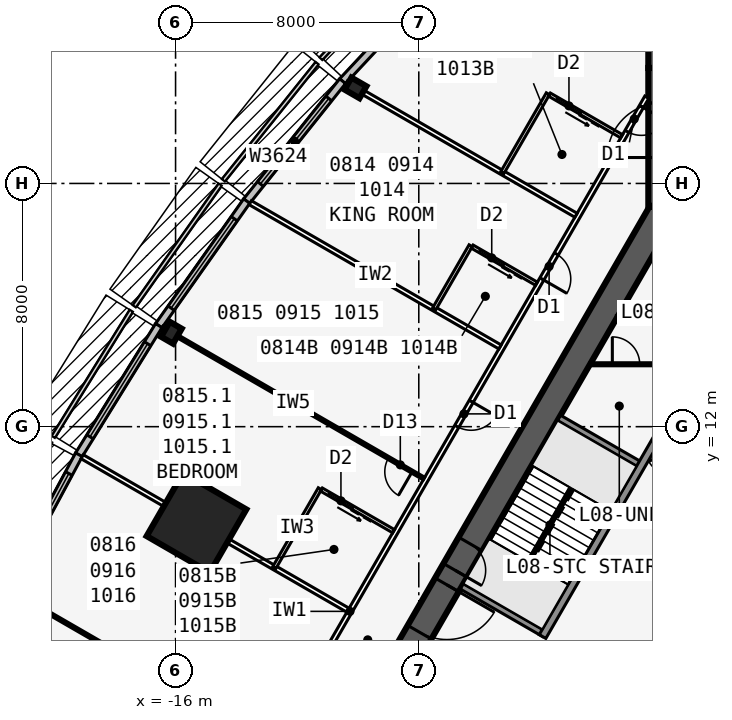
"""IFC4 building model, lengths in metres.
Left out: names, types, materials, properties, quantities, classifications, styles, units other than length and angle.
Written with IfcOpenShell. Run it as: python <this file> out.ifc"""

import sys

from ifc_helpers import new_model, si_unit, direction, frame, frame_2d, origin, origin_2d, place, context, subcontext, project, spatial, rectangle, i_section, extrude, element, fill, save


model = new_model("IFC4")
c1 = context("Model", 3, precision=1e-05, world=origin(), true_north=direction((0.0, 1.0)))
c2 = subcontext(c1, "Body", "Model", "MODEL_VIEW")
j1 = project(units=[si_unit("LENGTHUNIT", "METRE"), si_unit("PLANEANGLEUNIT", "RADIAN")], contexts=[c1])
p1 = place(None, origin())
s1 = spatial("IfcSite", under=j1, at=p1, CompositionType="ELEMENT")
p2 = place(p1, origin())
s2 = spatial("IfcBuilding", under=s1, at=p2, CompositionType="ELEMENT")
p3 = place(p2, frame((0.0, 0.0, 38.7)))
s3 = spatial("IfcBuildingStorey", under=s2, at=p3, CompositionType="ELEMENT", Elevation=38.7)
p4 = place(p3, frame((16.5, -9.526, 0.0), z_axis=(0.0, 0.0, 1.0), x_axis=(-0.499999749417, 0.866025548458, 0.0)))
e1 = element("IfcWall", 1, at=p4, inside=s3, PredefinedType="SHEAR", context=c2, shape_type="SweptSolid", body=[
    extrude(rectangle(XDim=33.0, YDim=0.9, at=frame_2d((16.5, 0.0))), origin(), (0.0, 0.0, 1.0), 3.4),
])
p5 = place(p4, frame((14.15, 0.0, 0.0)))
e2 = element("IfcOpeningElement", 2, at=p5, cuts=e1, PredefinedType="OPENING", context=c2, shape_type="SweptSolid", body=[
    extrude(rectangle(XDim=1.8, YDim=2.13, at=frame_2d((0.9, 1.065))), frame((0.0, 0.46, 0.0), z_axis=(0.0, -1.0, 0.0), x_axis=(1.0, 0.0, 0.0)), (0.0, 0.0, 1.0), 0.92),
])
p6 = place(p4, frame((12.6, 0.0, 0.0)))
e3 = element("IfcOpeningElement", 3, at=p6, cuts=e1, PredefinedType="OPENING", context=c2, shape_type="SweptSolid", body=[
    extrude(rectangle(XDim=1.0, YDim=2.13, at=frame_2d((0.5, 1.065))), frame((0.0, 0.46, 0.0), z_axis=(0.0, -1.0, 0.0), x_axis=(1.0, 0.0, 0.0)), (0.0, 0.0, 1.0), 0.92),
])
p7 = place(p3, frame((0.0, 19.052, 0.0), z_axis=(0.0, 0.0, 1.0), x_axis=(-0.499999749417, -0.866025548458, 0.0)))
e4 = element("IfcWall", 4, at=p7, inside=s3, PredefinedType="SHEAR", context=c2, shape_type="SweptSolid", body=[
    extrude(rectangle(XDim=33.0, YDim=0.9, at=frame_2d((16.5, 0.0))), origin(), (0.0, 0.0, 1.0), 3.4),
])
p8 = place(p7, frame((14.15, 0.0, 0.0)))
e5 = element("IfcOpeningElement", 5, at=p8, cuts=e4, PredefinedType="OPENING", context=c2, shape_type="SweptSolid", body=[
    extrude(rectangle(XDim=1.8, YDim=2.13, at=frame_2d((0.9, 1.065))), frame((0.0, 0.46, 0.0), z_axis=(0.0, -1.0, 0.0), x_axis=(1.0, 0.0, 0.0)), (0.0, 0.0, 1.0), 0.92),
])
p9 = place(p7, frame((12.6, 0.0, 0.0)))
e6 = element("IfcOpeningElement", 6, at=p9, cuts=e4, PredefinedType="OPENING", context=c2, shape_type="SweptSolid", body=[
    extrude(rectangle(XDim=1.0, YDim=2.13, at=frame_2d((0.5, 1.065))), frame((0.0, 0.46, 0.0), z_axis=(0.0, -1.0, 0.0), x_axis=(1.0, 0.0, 0.0)), (0.0, 0.0, 1.0), 0.92),
])
p10 = place(p3, frame((-0.062, 11.794, 0.0), z_axis=(0.0, 0.0, 1.0), x_axis=(-0.500006680225, -0.86602154692, 0.0)))
e7 = element("IfcWall", 7, at=p10, inside=s3, PredefinedType="SOLIDWALL", context=c2, shape_type="SweptSolid", body=[
    extrude(rectangle(XDim=7.733, YDim=0.25, at=frame_2d((3.866, 0.0))), origin(), (0.0, 0.0, 1.0), 3.235),
])
for number, where, z_axis, x_axis in (
    (8, (-0.679, 10.727, 0.0), (0.0, 0.0, 1.0), (-0.866, 0.5, 0.0)),
    (9, (-3.879, 5.184, 0.0), (0.0, 0.0, 1.0), (-0.866, 0.5, 0.0)),
):
    element("IfcWall", number, at=place(p3, frame(where, z_axis=z_axis, x_axis=x_axis)), inside=s3, PredefinedType="SOLIDWALL", context=c2, shape_type="SweptSolid", body=[
        extrude(rectangle(XDim=3.125, YDim=0.2, at=frame_2d((1.562, 0.0))), origin(), (0.0, 0.0, 1.0), 3.235),
    ])
p11 = place(p3, frame((0.0, 19.052, 0.0), z_axis=(0.0, 0.0, 1.0), x_axis=(0.0, 1.0, 0.0)))
e10 = element("IfcWall", 10, at=p11, inside=s3, PredefinedType="SHEAR", context=c2, shape_type="SweptSolid", body=[
    extrude(rectangle(XDim=4.746, YDim=0.9, at=frame_2d((2.373, 0.0))), origin(), (0.0, 0.0, 1.0), 3.4),
])
p12 = place(p11, frame((1.8, 0.0, 0.0)))
e11 = element("IfcOpeningElement", 11, at=p12, cuts=e10, PredefinedType="OPENING", context=c2, shape_type="SweptSolid", body=[
    extrude(rectangle(XDim=1.8, YDim=2.13, at=frame_2d((0.9, 1.065))), frame((0.0, 0.46, 0.0), z_axis=(0.0, -1.0, 0.0), x_axis=(1.0, 0.0, 0.0)), (0.0, 0.0, 1.0), 0.92),
])
p13 = place(p3, frame((0.0, 23.799, 0.0), z_axis=(0.0, 0.0, 1.0), x_axis=(0.0, 1.0, 0.0)))
e12 = element("IfcWall", 12, at=p13, inside=s3, PredefinedType="SHEAR", context=c2, shape_type="SweptSolid", body=[
    extrude(rectangle(XDim=1.155, YDim=0.9, at=frame_2d((0.577, 0.0))), origin(), (0.0, 0.0, 1.0), 3.4),
])
for number, where, z_axis, x_axis in (
    (13, (-10.083, 23.142, 0.0), (0.0, 0.0, 1.0), (-0.5, -0.866, 0.0)),
    (14, (-16.137, 15.09, 0.0), (0.0, 0.0, 1.0), (-0.866, 0.5, 0.0)),
):
    element("IfcColumn", number, at=place(p3, frame(where, z_axis=z_axis, x_axis=x_axis)), inside=s3, PredefinedType="COLUMN", context=c2, shape_type="SweptSolid", body=[
        extrude(i_section(OverallWidth=0.455, OverallDepth=0.569, WebThickness=0.078, FlangeThickness=0.125, at=origin_2d()), origin(), (0.0, 0.0, 1.0), 3.4),
    ])
p14 = place(p3, frame((-15.312, 8.84, 0.0), z_axis=(0.0, 0.0, 1.0), x_axis=(-0.866025403784, 0.5, 0.0)))
e15 = element("IfcColumn", 15, at=p14, inside=s3, PredefinedType="COLUMN", context=c2, shape_type="SweptSolid", body=[
    extrude(rectangle(XDim=2.4, YDim=2.4, at=origin_2d()), origin(), (0.0, 0.0, 1.0), 3.4),
])
p15 = place(p3, frame((-4.909, 29.36, 0.0), z_axis=(0.0, 0.0, 1.0), x_axis=(-0.682289646561, -0.731081964075, 0.0)))
e16 = element("IfcWall", 16, at=p15, inside=s3, PredefinedType="STANDARD", context=c2, shape_type="SweptSolid", body=[
    extrude(rectangle(XDim=8.211, YDim=0.25, at=frame_2d((4.105, 0.0))), origin(), (0.0, 0.0, 1.0), 3.235),
])
p16 = place(p15, frame((2.006, 0.0, 0.45)))
e17 = element("IfcOpeningElement", 17, at=p16, cuts=e16, PredefinedType="OPENING", context=c2, shape_type="SweptSolid", body=[
    extrude(rectangle(XDim=4.2, YDim=2.4, at=frame_2d((2.1, 1.2))), frame((0.0, 0.135, 0.0), z_axis=(0.0, -1.0, 0.0), x_axis=(1.0, 0.0, 0.0)), (0.0, 0.0, 1.0), 0.27),
])
p17 = place(p3, frame((-10.505, 23.364, 0.0), z_axis=(0.0, 0.0, 1.0), x_axis=(-0.624594965756, -0.780948864364, 0.0)))
e18 = element("IfcWall", 18, at=p17, inside=s3, PredefinedType="STANDARD", context=c2, shape_type="SweptSolid", body=[
    extrude(rectangle(XDim=5.058, YDim=0.25, at=frame_2d((2.529, 0.0))), origin(), (0.0, 0.0, 1.0), 3.235),
])
p18 = place(p17, frame((0.729, 0.0, 0.45)))
e19 = element("IfcOpeningElement", 19, at=p18, cuts=e18, PredefinedType="OPENING", context=c2, shape_type="SweptSolid", body=[
    extrude(rectangle(XDim=3.6, YDim=2.4, at=frame_2d((1.8, 1.2))), frame((0.0, 0.135, 0.0), z_axis=(0.0, -1.0, 0.0), x_axis=(1.0, 0.0, 0.0)), (0.0, 0.0, 1.0), 0.27),
])
p19 = place(p3, frame((-13.659, 19.42, 0.0), z_axis=(0.0, 0.0, 1.0), x_axis=(-0.5766431066, -0.81699616132, 0.0)))
e20 = element("IfcWall", 20, at=p19, inside=s3, PredefinedType="STANDARD", context=c2, shape_type="SweptSolid", body=[
    extrude(rectangle(XDim=5.021, YDim=0.25, at=frame_2d((2.51, 0.0))), origin(), (0.0, 0.0, 1.0), 3.235),
])
p20 = place(p19, frame((0.71, 0.0, 0.45)))
e21 = element("IfcOpeningElement", 21, at=p20, cuts=e20, PredefinedType="OPENING", context=c2, shape_type="SweptSolid", body=[
    extrude(rectangle(XDim=3.6, YDim=2.4, at=frame_2d((1.8, 1.2))), frame((0.0, 0.135, 0.0), z_axis=(0.0, -1.0, 0.0), x_axis=(1.0, 0.0, 0.0)), (0.0, 0.0, 1.0), 0.27),
])
p21 = place(p3, frame((-16.551, 15.324, 0.0), z_axis=(0.0, 0.0, 1.0), x_axis=(-0.526132807704, -0.850402415717, 0.0)))
e22 = element("IfcWall", 22, at=p21, inside=s3, PredefinedType="STANDARD", context=c2, shape_type="SweptSolid", body=[
    extrude(rectangle(XDim=5.002, YDim=0.25, at=frame_2d((2.501, 0.0))), origin(), (0.0, 0.0, 1.0), 3.235),
])
p22 = place(p21, frame((0.701, 0.0, 0.45)))
e23 = element("IfcOpeningElement", 23, at=p22, cuts=e22, PredefinedType="OPENING", context=c2, shape_type="SweptSolid", body=[
    extrude(rectangle(XDim=3.6, YDim=2.4, at=frame_2d((1.8, 1.2))), frame((0.0, 0.135, 0.0), z_axis=(0.0, -1.0, 0.0), x_axis=(1.0, 0.0, 0.0)), (0.0, 0.0, 1.0), 0.27),
])
p23 = place(p3, frame((-19.178, 11.077, 0.0), z_axis=(0.0, 0.0, 1.0), x_axis=(-0.473412820489, -0.880840678782, 0.0)))
e24 = element("IfcWall", 24, at=p23, inside=s3, PredefinedType="STANDARD", context=c2, shape_type="SweptSolid", body=[
    extrude(rectangle(XDim=5.002, YDim=0.25, at=frame_2d((2.501, 0.0))), origin(), (0.0, 0.0, 1.0), 3.235),
])
p24 = place(p23, frame((0.701, 0.0, 0.45)))
e25 = element("IfcOpeningElement", 25, at=p24, cuts=e24, PredefinedType="OPENING", context=c2, shape_type="SweptSolid", body=[
    extrude(rectangle(XDim=3.6, YDim=2.4, at=frame_2d((1.8, 1.2))), frame((0.0, 0.135, 0.0), z_axis=(0.0, -1.0, 0.0), x_axis=(1.0, 0.0, 0.0)), (0.0, 0.0, 1.0), 0.27),
])
p25 = place(p3, frame((-0.5, 22.836, 0.0), z_axis=(0.0, 0.0, 1.0), x_axis=(-0.500001677587, -0.866024435227, 0.0)))
e26 = element("IfcWall", 26, at=p25, inside=s3, PredefinedType="PARTITIONING", context=c2, shape_type="SweptSolid", body=[
    extrude(rectangle(XDim=39.054, YDim=0.15, at=frame_2d((19.527, 0.0))), origin(), (0.0, 0.0, 1.0), 3.235),
])
p26 = place(p25, frame((0.352, 0.0, 0.0)))
e27 = element("IfcOpeningElement", 27, at=p26, cuts=e26, PredefinedType="OPENING", context=c2, shape_type="SweptSolid", body=[
    extrude(rectangle(XDim=0.95, YDim=2.13, at=frame_2d((0.475, 1.065))), frame((0.0, 0.085, 0.0), z_axis=(0.0, -1.0, 0.0), x_axis=(1.0, 0.0, 0.0)), (0.0, 0.0, 1.0), 0.17),
])
p27 = place(p25, frame((5.952, 0.0, 0.0)))
e28 = element("IfcOpeningElement", 28, at=p27, cuts=e26, PredefinedType="OPENING", context=c2, shape_type="SweptSolid", body=[
    extrude(rectangle(XDim=0.95, YDim=2.13, at=frame_2d((0.475, 1.065))), frame((0.0, 0.085, 0.0), z_axis=(0.0, -1.0, 0.0), x_axis=(1.0, 0.0, 0.0)), (0.0, 0.0, 1.0), 0.17),
])
p28 = place(p25, frame((11.552, 0.0, 0.0)))
e29 = element("IfcOpeningElement", 29, at=p28, cuts=e26, PredefinedType="OPENING", context=c2, shape_type="SweptSolid", body=[
    extrude(rectangle(XDim=0.95, YDim=2.13, at=frame_2d((0.475, 1.065))), frame((0.0, 0.085, 0.0), z_axis=(0.0, -1.0, 0.0), x_axis=(1.0, 0.0, 0.0)), (0.0, 0.0, 1.0), 0.17),
])
p29 = place(p25, frame((21.552, 0.0, 0.0)))
e30 = element("IfcOpeningElement", 30, at=p29, cuts=e26, PredefinedType="OPENING", context=c2, shape_type="SweptSolid", body=[
    extrude(rectangle(XDim=0.95, YDim=2.13, at=frame_2d((0.475, 1.065))), frame((0.0, 0.085, 0.0), z_axis=(0.0, -1.0, 0.0), x_axis=(1.0, 0.0, 0.0)), (0.0, 0.0, 1.0), 0.17),
])
p30 = place(p25, frame((30.952, 0.0, 0.0)))
e31 = element("IfcOpeningElement", 31, at=p30, cuts=e26, PredefinedType="OPENING", context=c2, shape_type="SweptSolid", body=[
    extrude(rectangle(XDim=0.95, YDim=2.13, at=frame_2d((0.475, 1.065))), frame((0.0, 0.085, 0.0), z_axis=(0.0, -1.0, 0.0), x_axis=(1.0, 0.0, 0.0)), (0.0, 0.0, 1.0), 0.17),
])
p31 = place(p25, frame((37.752, 0.0, 0.0)))
e32 = element("IfcOpeningElement", 32, at=p31, cuts=e26, PredefinedType="OPENING", context=c2, shape_type="SweptSolid", body=[
    extrude(rectangle(XDim=0.95, YDim=2.13, at=frame_2d((0.475, 1.065))), frame((0.0, 0.085, 0.0), z_axis=(0.0, -1.0, 0.0), x_axis=(1.0, 0.0, 0.0)), (0.0, 0.0, 1.0), 0.17),
])
p32 = place(p3, frame((-2.829, 18.954, 0.0), z_axis=(0.0, 0.0, 1.0), x_axis=(-0.866020536561, 0.500008430184, 0.0)))
e33 = element("IfcWall", 33, at=p32, inside=s3, PredefinedType="PARTITIONING", context=c2, shape_type="SweptSolid", body=[
    extrude(rectangle(XDim=8.72, YDim=0.15, at=frame_2d((4.36, 0.0))), origin(), (0.0, 0.0, 1.0), 2.389),
])
p33 = place(p3, frame((-5.329, 14.623, 0.0), z_axis=(0.0, 0.0, 1.0), x_axis=(-0.866018409083, 0.500012114982, 0.0)))
e34 = element("IfcWall", 34, at=p33, inside=s3, PredefinedType="PARTITIONING", context=c2, shape_type="SweptSolid", body=[
    extrude(rectangle(XDim=9.485, YDim=0.15, at=frame_2d((4.742, 0.0))), origin(), (0.0, 0.0, 1.0), 2.389),
])
p34 = place(p3, frame((-7.829, 10.293, 0.0), z_axis=(0.0, 0.0, 1.0), x_axis=(-0.866016302457, 0.50001576363, 0.0)))
e35 = element("IfcWall", 35, at=p34, inside=s3, PredefinedType="PARTITIONING", context=c2, shape_type="SweptSolid", body=[
    extrude(rectangle(XDim=9.943, YDim=0.1, at=frame_2d((4.972, 0.0))), origin(), (0.0, 0.0, 1.0), 2.389),
])
p35 = place(p34, frame((0.45, 0.0, 0.0)))
e36 = element("IfcOpeningElement", 36, at=p35, cuts=e35, PredefinedType="OPENING", context=c2, shape_type="SweptSolid", body=[
    extrude(rectangle(XDim=0.9, YDim=2.13, at=frame_2d((0.45, 1.065))), frame((0.0, 0.06, 0.0), z_axis=(0.0, -1.0, 0.0), x_axis=(1.0, 0.0, 0.0)), (0.0, 0.0, 1.0), 0.12),
])
p36 = place(p3, frame((-10.329, 5.963, 0.0), z_axis=(0.0, 0.0, 1.0), x_axis=(-0.866021688545, 0.500006434927, 0.0)))
e37 = element("IfcWall", 37, at=p36, inside=s3, PredefinedType="PARTITIONING", context=c2, shape_type="SweptSolid", body=[
    extrude(rectangle(XDim=10.096, YDim=0.15, at=frame_2d((5.048, 0.0))), origin(), (0.0, 0.0, 1.0), 2.389),
])
p37 = place(p3, frame((-12.829, 1.633, 0.0), z_axis=(0.0, 0.0, 1.0), x_axis=(-0.866026934769, 0.499997348248, 0.0)))
e38 = element("IfcWall", 38, at=p37, inside=s3, PredefinedType="PARTITIONING", context=c2, shape_type="SweptSolid", body=[
    extrude(rectangle(XDim=9.943, YDim=0.1, at=frame_2d((4.971, 0.0))), origin(), (0.0, 0.0, 1.0), 2.389),
])
p38 = place(p37, frame((0.45, 0.0, 0.0)))
e39 = element("IfcOpeningElement", 39, at=p38, cuts=e38, PredefinedType="OPENING", context=c2, shape_type="SweptSolid", body=[
    extrude(rectangle(XDim=0.9, YDim=2.13, at=frame_2d((0.45, 1.065))), frame((0.0, 0.06, 0.0), z_axis=(0.0, -1.0, 0.0), x_axis=(1.0, 0.0, 0.0)), (0.0, 0.0, 1.0), 0.12),
])
p39 = place(p3, frame((-3.753, 22.952, 0.0), z_axis=(0.0, 0.0, 1.0), x_axis=(-0.499990139034, -0.866031096941, 0.0)))
e40 = element("IfcWall", 40, at=p39, inside=s3, PredefinedType="PLUMBINGWALL", context=c2, shape_type="SweptSolid", body=[
    extrude(rectangle(XDim=3.0, YDim=0.12, at=frame_2d((1.5, 0.0))), origin(), (0.0, 0.0, 1.0), 3.235),
])
p40 = place(p3, frame((-1.329, 21.552, 0.0), z_axis=(0.0, 0.0, 1.0), x_axis=(-0.865997131366, 0.500048966069, 0.0)))
e41 = element("IfcWall", 41, at=p40, inside=s3, PredefinedType="PLUMBINGWALL", context=c2, shape_type="SweptSolid", body=[
    extrude(rectangle(XDim=2.74, YDim=0.12, at=frame_2d((1.37, 0.0))), origin(), (0.0, 0.0, 1.0), 3.235),
])
p41 = place(p40, frame((1.55, 0.0, 0.0)))
e42 = element("IfcOpeningElement", 42, at=p41, cuts=e41, PredefinedType="OPENING", context=c2, shape_type="SweptSolid", body=[
    extrude(rectangle(XDim=0.9, YDim=2.13, at=frame_2d((0.45, 1.065))), frame((0.0, 0.07, 0.0), z_axis=(0.0, -1.0, 0.0), x_axis=(1.0, 0.0, 0.0)), (0.0, 0.0, 1.0), 0.14),
])
p42 = place(p3, frame((-6.293, 17.952, 0.0), z_axis=(0.0, 0.0, 1.0), x_axis=(-0.499957262057, -0.866050077142, 0.0)))
e43 = element("IfcWall", 43, at=p42, inside=s3, PredefinedType="PLUMBINGWALL", context=c2, shape_type="SweptSolid", body=[
    extrude(rectangle(XDim=2.4, YDim=0.12, at=frame_2d((1.2, 0.0))), origin(), (0.0, 0.0, 1.0), 3.235),
])
p43 = place(p3, frame((-4.128, 16.702, 0.0), z_axis=(0.0, 0.0, 1.0), x_axis=(-0.866048967903, 0.499959183527, 0.0)))
e44 = element("IfcWall", 44, at=p43, inside=s3, PredefinedType="PLUMBINGWALL", context=c2, shape_type="SweptSolid", body=[
    extrude(rectangle(XDim=2.44, YDim=0.12, at=frame_2d((1.22, 0.0))), origin(), (0.0, 0.0, 1.0), 3.235),
])
p44 = place(p43, frame((1.25, 0.0, 0.0)))
e45 = element("IfcOpeningElement", 45, at=p44, cuts=e44, PredefinedType="OPENING", context=c2, shape_type="SweptSolid", body=[
    extrude(rectangle(XDim=0.9, YDim=2.13, at=frame_2d((0.45, 1.065))), frame((0.0, 0.07, 0.0), z_axis=(0.0, -1.0, 0.0), x_axis=(1.0, 0.0, 0.0)), (0.0, 0.0, 1.0), 0.14),
])
p45 = place(p3, frame((-11.253, 9.961, 0.0), z_axis=(0.0, 0.0, 1.0), x_axis=(-0.499990139034, -0.866031096941, 0.0)))
e46 = element("IfcWall", 46, at=p45, inside=s3, PredefinedType="PLUMBINGWALL", context=c2, shape_type="SweptSolid", body=[
    extrude(rectangle(XDim=3.0, YDim=0.12, at=frame_2d((1.5, 0.0))), origin(), (0.0, 0.0, 1.0), 3.235),
])
p46 = place(p3, frame((-8.829, 8.561, 0.0), z_axis=(0.0, 0.0, 1.0), x_axis=(-0.866035715982, 0.499982138324, 0.0)))
e47 = element("IfcWall", 47, at=p46, inside=s3, PredefinedType="PLUMBINGWALL", context=c2, shape_type="SweptSolid", body=[
    extrude(rectangle(XDim=2.74, YDim=0.12, at=frame_2d((1.37, 0.0))), origin(), (0.0, 0.0, 1.0), 3.235),
])
p47 = place(p46, frame((1.55, 0.0, 0.0)))
e48 = element("IfcOpeningElement", 48, at=p47, cuts=e47, PredefinedType="OPENING", context=c2, shape_type="SweptSolid", body=[
    extrude(rectangle(XDim=0.9, YDim=2.13, at=frame_2d((0.45, 1.065))), frame((0.0, 0.07, 0.0), z_axis=(0.0, -1.0, 0.0), x_axis=(1.0, 0.0, 0.0)), (0.0, 0.0, 1.0), 0.14),
])
p48 = place(p3, frame((-1.501, 15.552, 0.0), z_axis=(0.0, 0.0, 1.0), x_axis=(1.0, 0.0, 0.0)))
e49 = element("IfcWall", 49, at=p48, inside=s3, PredefinedType="SOLIDWALL", context=c2, shape_type="SweptSolid", body=[
    extrude(rectangle(XDim=3.002, YDim=0.2, at=frame_2d((1.501, 0.0))), origin(), (0.0, 0.0, 1.0), 3.235),
])
p49 = place(p3, frame((-2.367, 14.052, 0.0), z_axis=(0.0, 0.0, 1.0), x_axis=(1.0, 0.0, 0.0)))
e50 = element("IfcWall", 50, at=p49, inside=s3, PredefinedType="PARTITIONING", context=c2, shape_type="SweptSolid", body=[
    extrude(rectangle(XDim=4.734, YDim=0.1, at=frame_2d((2.367, 0.0))), origin(), (0.0, 0.0, 1.0), 3.235),
])
p50 = place(p49, frame((0.734, 0.0, 0.0)))
e51 = element("IfcOpeningElement", 51, at=p50, cuts=e50, PredefinedType="OPENING", context=c2, shape_type="SweptSolid", body=[
    extrude(rectangle(XDim=0.9, YDim=2.13, at=frame_2d((0.45, 1.065))), frame((0.0, 0.06, 0.0), z_axis=(0.0, -1.0, 0.0), x_axis=(1.0, 0.0, 0.0)), (0.0, 0.0, 1.0), 0.12),
])
p51 = place(p3, frame((-2.988, 9.978, 0.0), z_axis=(0.0, 0.0, 1.0), x_axis=(-0.499992232847, -0.866029888106, 0.0)))
e52 = element("IfcWall", 52, at=p51, inside=s3, PredefinedType="SOLIDWALL", context=c2, shape_type="SweptSolid", body=[
    extrude(rectangle(XDim=2.794, YDim=0.1, at=frame_2d((1.397, 0.0))), origin(), (0.0, 0.0, 1.0), 3.4),
])
p52 = place(p18, origin())
e53 = element("IfcWindow", 53, at=p52, inside=s3, PartitioningType="SINGLE_PANEL", PredefinedType="WINDOW", context=c2, shape_type="SweptSolid", body=[
    extrude(rectangle(XDim=3.6, YDim=2.4, at=frame_2d((1.8, 1.2))), frame((0.0, 0.03, 0.0), z_axis=(0.0, -1.0, 0.0), x_axis=(1.0, 0.0, 0.0)), (0.0, 0.0, 1.0), 0.06),
])
fill(e19, e53)
p53 = place(p20, origin())
e54 = element("IfcWindow", 54, at=p53, inside=s3, PartitioningType="SINGLE_PANEL", PredefinedType="WINDOW", context=c2, shape_type="SweptSolid", body=[
    extrude(rectangle(XDim=3.6, YDim=2.4, at=frame_2d((1.8, 1.2))), frame((0.0, 0.03, 0.0), z_axis=(0.0, -1.0, 0.0), x_axis=(1.0, 0.0, 0.0)), (0.0, 0.0, 1.0), 0.06),
])
fill(e21, e54)
p54 = place(p22, origin())
e55 = element("IfcWindow", 55, at=p54, inside=s3, PartitioningType="SINGLE_PANEL", PredefinedType="WINDOW", context=c2, shape_type="SweptSolid", body=[
    extrude(rectangle(XDim=3.6, YDim=2.4, at=frame_2d((1.8, 1.2))), frame((0.0, 0.03, 0.0), z_axis=(0.0, -1.0, 0.0), x_axis=(1.0, 0.0, 0.0)), (0.0, 0.0, 1.0), 0.06),
])
fill(e23, e55)
p55 = place(p24, origin())
e56 = element("IfcWindow", 56, at=p55, inside=s3, PartitioningType="SINGLE_PANEL", PredefinedType="WINDOW", context=c2, shape_type="SweptSolid", body=[
    extrude(rectangle(XDim=3.6, YDim=2.4, at=frame_2d((1.8, 1.2))), frame((0.0, 0.03, 0.0), z_axis=(0.0, -1.0, 0.0), x_axis=(1.0, 0.0, 0.0)), (0.0, 0.0, 1.0), 0.06),
])
fill(e25, e56)
p56 = place(p35, origin())
e57 = element("IfcDoor", 57, at=p56, inside=s3, OperationType="SINGLE_SWING_LEFT", PredefinedType="DOOR", context=c2, shape_type="SweptSolid", body=[
    extrude(rectangle(XDim=0.9, YDim=2.13, at=frame_2d((0.45, 1.065))), frame((0.0, 0.025, 0.0), z_axis=(0.0, -1.0, 0.0), x_axis=(1.0, 0.0, 0.0)), (0.0, 0.0, 1.0), 0.05),
])
fill(e36, e57)
p57 = place(p41, origin())
e58 = element("IfcDoor", 58, at=p57, inside=s3, OperationType="SLIDING_TO_LEFT", PredefinedType="DOOR", context=c2, shape_type="SweptSolid", body=[
    extrude(rectangle(XDim=0.9, YDim=2.13, at=frame_2d((0.45, 1.065))), frame((0.0, 0.025, 0.0), z_axis=(0.0, -1.0, 0.0), x_axis=(1.0, 0.0, 0.0)), (0.0, 0.0, 1.0), 0.05),
])
fill(e42, e58)
p58 = place(p26, origin())
e59 = element("IfcDoor", 59, at=p58, inside=s3, OperationType="SINGLE_SWING_LEFT", PredefinedType="DOOR", context=c2, shape_type="SweptSolid", body=[
    extrude(rectangle(XDim=0.95, YDim=2.13, at=frame_2d((0.475, 1.065))), frame((0.0, 0.025, 0.0), z_axis=(0.0, -1.0, 0.0), x_axis=(1.0, 0.0, 0.0)), (0.0, 0.0, 1.0), 0.05),
])
fill(e27, e59)
p59 = place(p44, origin())
e60 = element("IfcDoor", 60, at=p59, inside=s3, OperationType="SLIDING_TO_LEFT", PredefinedType="DOOR", context=c2, shape_type="SweptSolid", body=[
    extrude(rectangle(XDim=0.9, YDim=2.13, at=frame_2d((0.45, 1.065))), frame((0.0, 0.025, 0.0), z_axis=(0.0, -1.0, 0.0), x_axis=(1.0, 0.0, 0.0)), (0.0, 0.0, 1.0), 0.05),
])
fill(e45, e60)
p60 = place(p27, origin())
e61 = element("IfcDoor", 61, at=p60, inside=s3, OperationType="SINGLE_SWING_RIGHT", PredefinedType="DOOR", context=c2, shape_type="SweptSolid", body=[
    extrude(rectangle(XDim=0.95, YDim=2.13, at=frame_2d((0.475, 1.065))), frame((0.0, 0.025, 0.0), z_axis=(0.0, -1.0, 0.0), x_axis=(1.0, 0.0, 0.0)), (0.0, 0.0, 1.0), 0.05),
])
fill(e28, e61)
p61 = place(p28, origin())
e62 = element("IfcDoor", 62, at=p61, inside=s3, OperationType="SINGLE_SWING_LEFT", PredefinedType="DOOR", context=c2, shape_type="SweptSolid", body=[
    extrude(rectangle(XDim=0.95, YDim=2.13, at=frame_2d((0.475, 1.065))), frame((0.0, 0.025, 0.0), z_axis=(0.0, -1.0, 0.0), x_axis=(1.0, 0.0, 0.0)), (0.0, 0.0, 1.0), 0.05),
])
fill(e29, e62)
p62 = place(p47, origin())
e63 = element("IfcDoor", 63, at=p62, inside=s3, OperationType="SLIDING_TO_LEFT", PredefinedType="DOOR", context=c2, shape_type="SweptSolid", body=[
    extrude(rectangle(XDim=0.9, YDim=2.13, at=frame_2d((0.45, 1.065))), frame((0.0, 0.025, 0.0), z_axis=(0.0, -1.0, 0.0), x_axis=(1.0, 0.0, 0.0)), (0.0, 0.0, 1.0), 0.05),
])
fill(e48, e63)
p63 = place(p8, origin())
e64 = element("IfcDoor", 64, at=p63, inside=s3, OperationType="DOUBLE_DOOR_SINGLE_SWING", PredefinedType="DOOR", context=c2, shape_type="SweptSolid", body=[
    extrude(rectangle(XDim=1.8, YDim=2.13, at=frame_2d((0.9, 1.065))), frame((0.0, 0.025, 0.0), z_axis=(0.0, -1.0, 0.0), x_axis=(1.0, 0.0, 0.0)), (0.0, 0.0, 1.0), 0.05),
])
fill(e5, e64)
p64 = place(p9, origin())
e65 = element("IfcDoor", 65, at=p64, inside=s3, OperationType="SINGLE_SWING_RIGHT", PredefinedType="DOOR", context=c2, shape_type="SweptSolid", body=[
    extrude(rectangle(XDim=1.0, YDim=2.13, at=frame_2d((0.5, 1.065))), frame((0.0, 0.025, 0.0), z_axis=(0.0, -1.0, 0.0), x_axis=(1.0, 0.0, 0.0)), (0.0, 0.0, 1.0), 0.05),
])
fill(e6, e65)
p65 = place(p50, origin())
e66 = element("IfcDoor", 66, at=p65, inside=s3, OperationType="SINGLE_SWING_LEFT", PredefinedType="DOOR", context=c2, shape_type="SweptSolid", body=[
    extrude(rectangle(XDim=0.9, YDim=2.13, at=frame_2d((0.45, 1.065))), frame((0.0, 0.025, 0.0), z_axis=(0.0, -1.0, 0.0), x_axis=(1.0, 0.0, 0.0)), (0.0, 0.0, 1.0), 0.05),
])
fill(e51, e66)
save(model, sys.argv[1])
